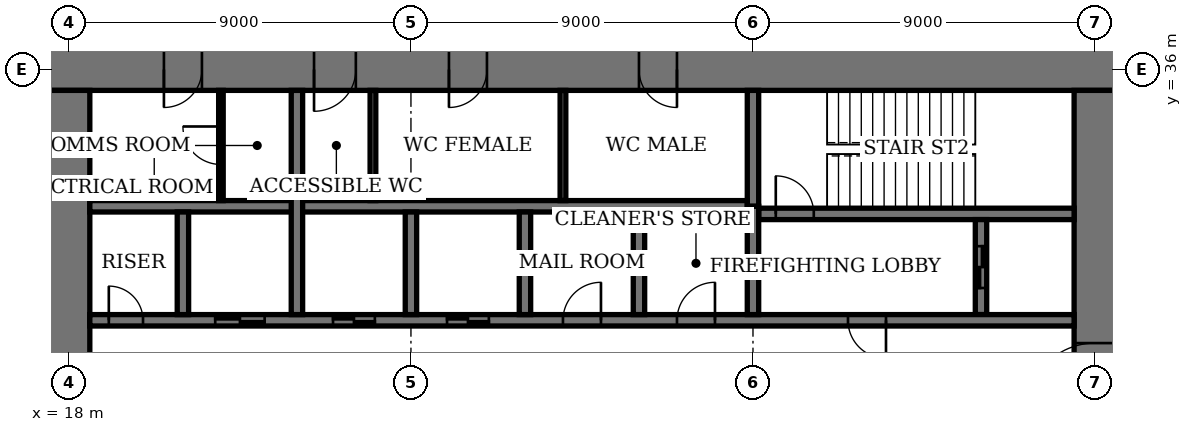
"""IFC4 building model, lengths in metres.
Left out: names, types, materials, properties, quantities, classifications, styles, units other than length and angle.
Written with IfcOpenShell. Run it as: python <this file> out.ifc"""

import sys

from ifc_helpers import new_model, si_unit, direction, frame, frame_2d, origin, place, context, subcontext, project, spatial, rectangle, extrude, element, fill, save


model = new_model("IFC4")
c1 = context("Model", 3, precision=1e-05, world=origin(), true_north=direction((0.0, 1.0)))
c2 = subcontext(c1, "Body", "Model", "MODEL_VIEW")
j1 = project(units=[si_unit("LENGTHUNIT", "METRE"), si_unit("PLANEANGLEUNIT", "RADIAN")], contexts=[c1])
p1 = place(None, origin())
s1 = spatial("IfcSite", under=j1, at=p1, CompositionType="ELEMENT")
p2 = place(p1, origin())
s2 = spatial("IfcBuilding", under=s1, at=p2, CompositionType="ELEMENT")
p3 = place(p2, frame((0.0, 0.0, 230.2)))
s3 = spatial("IfcBuildingStorey", under=s2, at=p3, CompositionType="ELEMENT", Elevation=230.2)
p4 = place(p3, frame((45.55, 36.0, 0.0), z_axis=(0.0, 0.0, 1.0), x_axis=(-1.0, 0.0, 0.0)))
e1 = element("IfcWall", 1, at=p4, inside=s3, PredefinedType="SHEAR", context=c2, shape_type="SweptSolid", body=[
    extrude(rectangle(XDim=28.1, YDim=1.1, at=frame_2d((14.05, 0.0))), origin(), (0.0, 0.0, 1.0), 4.2),
])
p5 = place(p4, frame((11.55, 0.0, 0.0)))
e2 = element("IfcOpeningElement", 2, at=p5, cuts=e1, PredefinedType="OPENING", context=c2, shape_type="SweptSolid", body=[
    extrude(rectangle(XDim=1.0, YDim=2.4, at=frame_2d((0.5, 1.2))), frame((0.0, 0.56, 0.0), z_axis=(0.0, -1.0, 0.0), x_axis=(1.0, 0.0, 0.0)), (0.0, 0.0, 1.0), 1.12),
])
p6 = place(p4, frame((16.55, 0.0, 0.0)))
e3 = element("IfcOpeningElement", 3, at=p6, cuts=e1, PredefinedType="OPENING", context=c2, shape_type="SweptSolid", body=[
    extrude(rectangle(XDim=1.0, YDim=2.4, at=frame_2d((0.5, 1.2))), frame((0.0, 0.56, 0.0), z_axis=(0.0, -1.0, 0.0), x_axis=(1.0, 0.0, 0.0)), (0.0, 0.0, 1.0), 1.12),
])
p7 = place(p4, frame((20.0, 0.0, 0.0)))
e4 = element("IfcOpeningElement", 4, at=p7, cuts=e1, PredefinedType="OPENING", context=c2, shape_type="SweptSolid", body=[
    extrude(rectangle(XDim=1.1, YDim=2.4, at=frame_2d((0.55, 1.2))), frame((0.0, 0.56, 0.0), z_axis=(0.0, -1.0, 0.0), x_axis=(1.0, 0.0, 0.0)), (0.0, 0.0, 1.0), 1.12),
])
p8 = place(p4, frame((24.05, 0.0, 0.0)))
e5 = element("IfcOpeningElement", 5, at=p8, cuts=e1, PredefinedType="OPENING", context=c2, shape_type="SweptSolid", body=[
    extrude(rectangle(XDim=1.0, YDim=2.4, at=frame_2d((0.5, 1.2))), frame((0.0, 0.56, 0.0), z_axis=(0.0, -1.0, 0.0), x_axis=(1.0, 0.0, 0.0)), (0.0, 0.0, 1.0), 1.12),
])
p9 = place(p3, frame((18.0, 35.45, 0.0), z_axis=(0.0, 0.0, 1.0), x_axis=(0.0, -1.0, 0.0)))
e6 = element("IfcWall", 6, at=p9, inside=s3, PredefinedType="SHEAR", context=c2, shape_type="SweptSolid", body=[
    extrude(rectangle(XDim=16.9, YDim=1.1, at=frame_2d((8.45, 0.0))), origin(), (0.0, 0.0, 1.0), 4.2),
])
p10 = place(p9, frame((8.45, 0.0, 0.0)))
e7 = element("IfcOpeningElement", 7, at=p10, cuts=e6, PredefinedType="OPENING", context=c2, shape_type="SweptSolid", body=[
    extrude(rectangle(XDim=1.8, YDim=2.4, at=frame_2d((0.9, 1.2))), frame((0.0, 0.56, 0.0), z_axis=(0.0, -1.0, 0.0), x_axis=(1.0, 0.0, 0.0)), (0.0, 0.0, 1.0), 1.12),
])
p11 = place(p3, frame((45.0, 18.55, 0.0), z_axis=(0.0, 0.0, 1.0), x_axis=(0.0, 1.0, 0.0)))
e8 = element("IfcWall", 8, at=p11, inside=s3, PredefinedType="SHEAR", context=c2, shape_type="SweptSolid", body=[
    extrude(rectangle(XDim=16.9, YDim=1.1, at=frame_2d((8.45, 0.0))), origin(), (0.0, 0.0, 1.0), 4.2),
])
p12 = place(p11, frame((8.45, 0.0, 0.0)))
e9 = element("IfcOpeningElement", 9, at=p12, cuts=e8, PredefinedType="OPENING", context=c2, shape_type="SweptSolid", body=[
    extrude(rectangle(XDim=1.8, YDim=2.4, at=frame_2d((0.9, 1.2))), frame((0.0, 0.56, 0.0), z_axis=(0.0, -1.0, 0.0), x_axis=(1.0, 0.0, 0.0)), (0.0, 0.0, 1.0), 1.12),
])
p13 = place(p3, frame((36.15, 32.2, 0.0), z_axis=(0.0, 0.0, 1.0), x_axis=(1.0, 0.0, 0.0)))
e10 = element("IfcWall", 10, at=p13, inside=s3, PredefinedType="SHEAR", context=c2, shape_type="SweptSolid", body=[
    extrude(rectangle(XDim=8.3, YDim=0.3, at=frame_2d((4.15, 0.0))), origin(), (0.0, 0.0, 1.0), 4.2),
])
p14 = place(p13, frame((0.45, 0.0, 0.0)))
e11 = element("IfcOpeningElement", 11, at=p14, cuts=e10, PredefinedType="OPENING", context=c2, shape_type="SweptSolid", body=[
    extrude(rectangle(XDim=1.0, YDim=2.4, at=frame_2d((0.5, 1.2))), frame((0.0, 0.16, 0.0), z_axis=(0.0, -1.0, 0.0), x_axis=(1.0, 0.0, 0.0)), (0.0, 0.0, 1.0), 0.32),
])
p15 = place(p3, frame((36.0, 32.4, 0.0), z_axis=(0.0, 0.0, 1.0), x_axis=(0.0, 1.0, 0.0)))
e12 = element("IfcWall", 12, at=p15, inside=s3, PredefinedType="SHEAR", context=c2, shape_type="SweptSolid", body=[
    extrude(rectangle(XDim=3.05, YDim=0.3, at=frame_2d((1.525, 0.0))), origin(), (0.0, 0.0, 1.0), 4.2),
])
p16 = place(p3, frame((42.0, 29.55, 0.0), z_axis=(0.0, 0.0, 1.0), x_axis=(0.0, 1.0, 0.0)))
e13 = element("IfcWall", 13, at=p16, inside=s3, PredefinedType="SHEAR", context=c2, shape_type="SweptSolid", body=[
    extrude(rectangle(XDim=2.5, YDim=0.3, at=frame_2d((1.25, 0.0))), origin(), (0.0, 0.0, 1.0), 4.2),
])
p17 = place(p16, frame((0.7, 0.0, 0.0)))
e14 = element("IfcOpeningElement", 14, at=p17, cuts=e13, PredefinedType="OPENING", context=c2, shape_type="SweptSolid", body=[
    extrude(rectangle(XDim=1.1, YDim=2.4, at=frame_2d((0.55, 1.2))), frame((0.0, 0.16, 0.0), z_axis=(0.0, -1.0, 0.0), x_axis=(1.0, 0.0, 0.0)), (0.0, 0.0, 1.0), 0.32),
])
p18 = place(p3, frame((18.55, 29.4, 0.0), z_axis=(0.0, 0.0, 1.0), x_axis=(1.0, 0.0, 0.0)))
e15 = element("IfcWall", 15, at=p18, inside=s3, PredefinedType="SHEAR", context=c2, shape_type="SweptSolid", body=[
    extrude(rectangle(XDim=25.9, YDim=0.3, at=frame_2d((12.95, 0.0))), origin(), (0.0, 0.0, 1.0), 4.2),
])
p19 = place(p18, frame((19.95, 0.0, 0.0)))
e16 = element("IfcOpeningElement", 16, at=p19, cuts=e15, PredefinedType="OPENING", context=c2, shape_type="SweptSolid", body=[
    extrude(rectangle(XDim=1.0, YDim=2.4, at=frame_2d((0.5, 1.2))), frame((0.0, 0.16, 0.0), z_axis=(0.0, -1.0, 0.0), x_axis=(1.0, 0.0, 0.0)), (0.0, 0.0, 1.0), 0.32),
])
p20 = place(p18, frame((0.5, 0.0, 0.0)))
e17 = element("IfcOpeningElement", 17, at=p20, cuts=e15, PredefinedType="OPENING", context=c2, shape_type="SweptSolid", body=[
    extrude(rectangle(XDim=0.9, YDim=2.1, at=frame_2d((0.45, 1.05))), frame((0.0, 0.16, 0.0), z_axis=(0.0, -1.0, 0.0), x_axis=(1.0, 0.0, 0.0)), (0.0, 0.0, 1.0), 0.32),
])
p21 = place(p18, frame((15.45, 0.0, 0.0)))
e18 = element("IfcOpeningElement", 18, at=p21, cuts=e15, PredefinedType="OPENING", context=c2, shape_type="SweptSolid", body=[
    extrude(rectangle(XDim=1.0, YDim=2.4, at=frame_2d((0.5, 1.2))), frame((0.0, 0.16, 0.0), z_axis=(0.0, -1.0, 0.0), x_axis=(1.0, 0.0, 0.0)), (0.0, 0.0, 1.0), 0.32),
])
p22 = place(p18, frame((12.45, 0.0, 0.0)))
e19 = element("IfcOpeningElement", 19, at=p22, cuts=e15, PredefinedType="OPENING", context=c2, shape_type="SweptSolid", body=[
    extrude(rectangle(XDim=1.0, YDim=2.4, at=frame_2d((0.5, 1.2))), frame((0.0, 0.16, 0.0), z_axis=(0.0, -1.0, 0.0), x_axis=(1.0, 0.0, 0.0)), (0.0, 0.0, 1.0), 0.32),
])
p23 = place(p18, frame((9.4, 0.0, 0.0)))
e20 = element("IfcOpeningElement", 20, at=p23, cuts=e15, PredefinedType="OPENING", context=c2, shape_type="SweptSolid", body=[
    extrude(rectangle(XDim=1.1, YDim=2.4, at=frame_2d((0.55, 1.2))), frame((0.0, 0.16, 0.0), z_axis=(0.0, -1.0, 0.0), x_axis=(1.0, 0.0, 0.0)), (0.0, 0.0, 1.0), 0.32),
])
p24 = place(p18, frame((6.4, 0.0, 0.0)))
e21 = element("IfcOpeningElement", 21, at=p24, cuts=e15, PredefinedType="OPENING", context=c2, shape_type="SweptSolid", body=[
    extrude(rectangle(XDim=1.1, YDim=2.4, at=frame_2d((0.55, 1.2))), frame((0.0, 0.16, 0.0), z_axis=(0.0, -1.0, 0.0), x_axis=(1.0, 0.0, 0.0)), (0.0, 0.0, 1.0), 0.32),
])
p25 = place(p18, frame((3.3, 0.0, 0.0)))
e22 = element("IfcOpeningElement", 22, at=p25, cuts=e15, PredefinedType="OPENING", context=c2, shape_type="SweptSolid", body=[
    extrude(rectangle(XDim=1.3, YDim=2.4, at=frame_2d((0.65, 1.2))), frame((0.0, 0.16, 0.0), z_axis=(0.0, -1.0, 0.0), x_axis=(1.0, 0.0, 0.0)), (0.0, 0.0, 1.0), 0.32),
])
p26 = place(p3, frame((18.55, 32.4, 0.0), z_axis=(0.0, 0.0, 1.0), x_axis=(1.0, 0.0, 0.0)))
e23 = element("IfcWall", 23, at=p26, inside=s3, PredefinedType="SHEAR", context=c2, shape_type="SweptSolid", body=[
    extrude(rectangle(XDim=17.3, YDim=0.3, at=frame_2d((8.65, 0.0))), origin(), (0.0, 0.0, 1.0), 4.2),
])
for number, where, z_axis, x_axis in (
    (24, (33.0, 29.55, 0.0), (0.0, 0.0, 1.0), (0.0, 1.0, 0.0)),
    (25, (30.0, 29.55, 0.0), (0.0, 0.0, 1.0), (0.0, 1.0, 0.0)),
    (26, (27.0, 29.55, 0.0), (0.0, 0.0, 1.0), (0.0, 1.0, 0.0)),
):
    element("IfcWall", number, at=place(p3, frame(where, z_axis=z_axis, x_axis=x_axis)), inside=s3, PredefinedType="SHEAR", context=c2, shape_type="SweptSolid", body=[
        extrude(rectangle(XDim=2.7, YDim=0.3, at=frame_2d((1.35, 0.0))), origin(), (0.0, 0.0, 1.0), 4.2),
    ])
p27 = place(p3, frame((24.0, 29.55, 0.0), z_axis=(0.0, 0.0, 1.0), x_axis=(0.0, 1.0, 0.0)))
e27 = element("IfcWall", 27, at=p27, inside=s3, PredefinedType="SHEAR", context=c2, shape_type="SweptSolid", body=[
    extrude(rectangle(XDim=5.9, YDim=0.3, at=frame_2d((2.95, 0.0))), origin(), (0.0, 0.0, 1.0), 4.2),
])
p28 = place(p3, frame((21.0, 29.55, 0.0), z_axis=(0.0, 0.0, 1.0), x_axis=(0.0, 1.0, 0.0)))
e28 = element("IfcWall", 28, at=p28, inside=s3, PredefinedType="SHEAR", context=c2, shape_type="SweptSolid", body=[
    extrude(rectangle(XDim=2.7, YDim=0.3, at=frame_2d((1.35, 0.0))), origin(), (0.0, 0.0, 1.0), 4.2),
])
p29 = place(p3, frame((36.0, 29.55, 0.0), z_axis=(0.0, 0.0, 1.0), x_axis=(0.0, 1.0, 0.0)))
e29 = element("IfcWall", 29, at=p29, inside=s3, PredefinedType="SHEAR", context=c2, shape_type="SweptSolid", body=[
    extrude(rectangle(XDim=2.85, YDim=0.3, at=frame_2d((1.425, 0.0))), origin(), (0.0, 0.0, 1.0), 4.2),
])
for number, where, z_axis, x_axis in (
    (30, (31.0, 32.55, 0.0), (0.0, 0.0, 1.0), (0.0, 1.0, 0.0)),
    (31, (26.0, 32.55, 0.0), (0.0, 0.0, 1.0), (0.0, 1.0, 0.0)),
):
    element("IfcWall", number, at=place(p3, frame(where, z_axis=z_axis, x_axis=x_axis)), inside=s3, PredefinedType="PARTITIONING", context=c2, shape_type="SweptSolid", body=[
        extrude(rectangle(XDim=2.9, YDim=0.15, at=frame_2d((1.45, 0.0))), origin(), (0.0, 0.0, 1.0), 3.85),
    ])
p30 = place(p3, frame((22.0, 32.55, 0.0), z_axis=(0.0, 0.0, 1.0), x_axis=(0.0, 1.0, 0.0)))
e32 = element("IfcWall", 32, at=p30, inside=s3, PredefinedType="PARTITIONING", context=c2, shape_type="SweptSolid", body=[
    extrude(rectangle(XDim=2.9, YDim=0.12, at=frame_2d((1.45, 0.0))), origin(), (0.0, 0.0, 1.0), 3.85),
])
p31 = place(p30, frame((0.95, 0.0, 0.0)))
e33 = element("IfcOpeningElement", 33, at=p31, cuts=e32, PredefinedType="OPENING", context=c2, shape_type="SweptSolid", body=[
    extrude(rectangle(XDim=1.0, YDim=2.4, at=frame_2d((0.5, 1.2))), frame((0.0, 0.07, 0.0), z_axis=(0.0, -1.0, 0.0), x_axis=(1.0, 0.0, 0.0)), (0.0, 0.0, 1.0), 0.14),
])
p32 = place(p12, origin())
e34 = element("IfcDoor", 34, at=p32, inside=s3, OperationType="DOUBLE_DOOR_DOUBLE_SWING", PredefinedType="DOOR", context=c2, shape_type="SweptSolid", body=[
    extrude(rectangle(XDim=1.8, YDim=2.4, at=frame_2d((0.9, 1.2))), frame((0.0, 0.03, 0.0), z_axis=(0.0, -1.0, 0.0), x_axis=(1.0, 0.0, 0.0)), (0.0, 0.0, 1.0), 0.06),
    extrude(rectangle(XDim=0.04, YDim=2.4, at=frame_2d((0.02, 1.2))), frame((0.0, 0.55, 0.0), z_axis=(0.0, -1.0, 0.0), x_axis=(1.0, 0.0, 0.0)), (0.0, 0.0, 1.0), 1.1),
    extrude(rectangle(XDim=0.04, YDim=2.4, at=frame_2d((1.78, 1.2))), frame((0.0, 0.55, 0.0), z_axis=(0.0, -1.0, 0.0), x_axis=(1.0, 0.0, 0.0)), (0.0, 0.0, 1.0), 1.1),
    extrude(rectangle(XDim=1.8, YDim=0.04, at=frame_2d((0.9, 2.38))), frame((0.0, 0.55, 0.0), z_axis=(0.0, -1.0, 0.0), x_axis=(1.0, 0.0, 0.0)), (0.0, 0.0, 1.0), 1.1),
])
fill(e9, e34)
p33 = place(p5, origin())
e35 = element("IfcDoor", 35, at=p33, inside=s3, OperationType="SINGLE_SWING_RIGHT", PredefinedType="DOOR", context=c2, shape_type="SweptSolid", body=[
    extrude(rectangle(XDim=1.0, YDim=2.4, at=frame_2d((0.5, 1.2))), frame((0.0, 0.025, 0.0), z_axis=(0.0, -1.0, 0.0), x_axis=(1.0, 0.0, 0.0)), (0.0, 0.0, 1.0), 0.05),
    extrude(rectangle(XDim=0.04, YDim=2.4, at=frame_2d((0.02, 1.2))), frame((0.0, 0.4, 0.0), z_axis=(0.0, -1.0, 0.0), x_axis=(1.0, 0.0, 0.0)), (0.0, 0.0, 1.0), 0.8),
    extrude(rectangle(XDim=0.04, YDim=2.4, at=frame_2d((0.98, 1.2))), frame((0.0, 0.4, 0.0), z_axis=(0.0, -1.0, 0.0), x_axis=(1.0, 0.0, 0.0)), (0.0, 0.0, 1.0), 0.8),
    extrude(rectangle(XDim=1.0, YDim=0.04, at=frame_2d((0.5, 2.38))), frame((0.0, 0.4, 0.0), z_axis=(0.0, -1.0, 0.0), x_axis=(1.0, 0.0, 0.0)), (0.0, 0.0, 1.0), 0.8),
])
fill(e2, e35)
p34 = place(p6, origin())
e36 = element("IfcDoor", 36, at=p34, inside=s3, OperationType="SINGLE_SWING_LEFT", PredefinedType="DOOR", context=c2, shape_type="SweptSolid", body=[
    extrude(rectangle(XDim=1.0, YDim=2.4, at=frame_2d((0.5, 1.2))), frame((0.0, 0.025, 0.0), z_axis=(0.0, -1.0, 0.0), x_axis=(1.0, 0.0, 0.0)), (0.0, 0.0, 1.0), 0.05),
    extrude(rectangle(XDim=0.04, YDim=2.4, at=frame_2d((0.02, 1.2))), frame((0.0, 0.4, 0.0), z_axis=(0.0, -1.0, 0.0), x_axis=(1.0, 0.0, 0.0)), (0.0, 0.0, 1.0), 0.8),
    extrude(rectangle(XDim=0.04, YDim=2.4, at=frame_2d((0.98, 1.2))), frame((0.0, 0.4, 0.0), z_axis=(0.0, -1.0, 0.0), x_axis=(1.0, 0.0, 0.0)), (0.0, 0.0, 1.0), 0.8),
    extrude(rectangle(XDim=1.0, YDim=0.04, at=frame_2d((0.5, 2.38))), frame((0.0, 0.4, 0.0), z_axis=(0.0, -1.0, 0.0), x_axis=(1.0, 0.0, 0.0)), (0.0, 0.0, 1.0), 0.8),
])
fill(e3, e36)
p35 = place(p7, origin())
e37 = element("IfcDoor", 37, at=p35, inside=s3, OperationType="SINGLE_SWING_LEFT", PredefinedType="DOOR", context=c2, shape_type="SweptSolid", body=[
    extrude(rectangle(XDim=1.1, YDim=2.4, at=frame_2d((0.55, 1.2))), frame((0.0, 0.025, 0.0), z_axis=(0.0, -1.0, 0.0), x_axis=(1.0, 0.0, 0.0)), (0.0, 0.0, 1.0), 0.05),
    extrude(rectangle(XDim=0.04, YDim=2.4, at=frame_2d((0.02, 1.2))), frame((0.0, 0.44, 0.0), z_axis=(0.0, -1.0, 0.0), x_axis=(1.0, 0.0, 0.0)), (0.0, 0.0, 1.0), 0.88),
    extrude(rectangle(XDim=0.04, YDim=2.4, at=frame_2d((1.08, 1.2))), frame((0.0, 0.44, 0.0), z_axis=(0.0, -1.0, 0.0), x_axis=(1.0, 0.0, 0.0)), (0.0, 0.0, 1.0), 0.88),
    extrude(rectangle(XDim=1.1, YDim=0.04, at=frame_2d((0.55, 2.38))), frame((0.0, 0.44, 0.0), z_axis=(0.0, -1.0, 0.0), x_axis=(1.0, 0.0, 0.0)), (0.0, 0.0, 1.0), 0.88),
])
fill(e4, e37)
p36 = place(p8, origin())
e38 = element("IfcDoor", 38, at=p36, inside=s3, OperationType="SINGLE_SWING_LEFT", PredefinedType="DOOR", context=c2, shape_type="SweptSolid", body=[
    extrude(rectangle(XDim=1.0, YDim=2.4, at=frame_2d((0.5, 1.2))), frame((0.0, 0.025, 0.0), z_axis=(0.0, -1.0, 0.0), x_axis=(1.0, 0.0, 0.0)), (0.0, 0.0, 1.0), 0.05),
    extrude(rectangle(XDim=0.04, YDim=2.4, at=frame_2d((0.02, 1.2))), frame((0.0, 0.4, 0.0), z_axis=(0.0, -1.0, 0.0), x_axis=(1.0, 0.0, 0.0)), (0.0, 0.0, 1.0), 0.8),
    extrude(rectangle(XDim=0.04, YDim=2.4, at=frame_2d((0.98, 1.2))), frame((0.0, 0.4, 0.0), z_axis=(0.0, -1.0, 0.0), x_axis=(1.0, 0.0, 0.0)), (0.0, 0.0, 1.0), 0.8),
    extrude(rectangle(XDim=1.0, YDim=0.04, at=frame_2d((0.5, 2.38))), frame((0.0, 0.4, 0.0), z_axis=(0.0, -1.0, 0.0), x_axis=(1.0, 0.0, 0.0)), (0.0, 0.0, 1.0), 0.8),
])
fill(e5, e38)
p37 = place(p14, origin())
e39 = element("IfcDoor", 39, at=p37, inside=s3, OperationType="SINGLE_SWING_RIGHT", PredefinedType="DOOR", context=c2, shape_type="SweptSolid", body=[
    extrude(rectangle(XDim=1.0, YDim=2.4, at=frame_2d((0.5, 1.2))), frame((0.0, 0.03, 0.0), z_axis=(0.0, -1.0, 0.0), x_axis=(1.0, 0.0, 0.0)), (0.0, 0.0, 1.0), 0.06),
])
fill(e11, e39)
p38 = place(p19, origin())
e40 = element("IfcDoor", 40, at=p38, inside=s3, OperationType="SINGLE_SWING_RIGHT", PredefinedType="DOOR", context=c2, shape_type="SweptSolid", body=[
    extrude(rectangle(XDim=1.0, YDim=2.4, at=frame_2d((0.5, 1.2))), frame((0.0, 0.03, 0.0), z_axis=(0.0, -1.0, 0.0), x_axis=(1.0, 0.0, 0.0)), (0.0, 0.0, 1.0), 0.06),
])
fill(e16, e40)
p39 = place(p20, origin())
e41 = element("IfcDoor", 41, at=p39, inside=s3, OperationType="SINGLE_SWING_RIGHT", PredefinedType="DOOR", context=c2, shape_type="SweptSolid", body=[
    extrude(rectangle(XDim=0.9, YDim=2.1, at=frame_2d((0.45, 1.05))), frame((0.0, 0.03, 0.0), z_axis=(0.0, -1.0, 0.0), x_axis=(1.0, 0.0, 0.0)), (0.0, 0.0, 1.0), 0.06),
])
fill(e17, e41)
p40 = place(p31, origin())
e42 = element("IfcDoor", 42, at=p40, inside=s3, OperationType="SINGLE_SWING_LEFT", PredefinedType="DOOR", context=c2, shape_type="SweptSolid", body=[
    extrude(rectangle(XDim=1.0, YDim=2.4, at=frame_2d((0.5, 1.2))), frame((0.0, 0.03, 0.0), z_axis=(0.0, -1.0, 0.0), x_axis=(1.0, 0.0, 0.0)), (0.0, 0.0, 1.0), 0.06),
])
fill(e33, e42)
p41 = place(p21, origin())
e43 = element("IfcDoor", 43, at=p41, inside=s3, OperationType="SINGLE_SWING_LEFT", PredefinedType="DOOR", context=c2, shape_type="SweptSolid", body=[
    extrude(rectangle(XDim=1.0, YDim=2.4, at=frame_2d((0.5, 1.2))), frame((0.0, 0.03, 0.0), z_axis=(0.0, -1.0, 0.0), x_axis=(1.0, 0.0, 0.0)), (0.0, 0.0, 1.0), 0.06),
])
fill(e18, e43)
p42 = place(p22, origin())
e44 = element("IfcDoor", 44, at=p42, inside=s3, OperationType="SINGLE_SWING_LEFT", PredefinedType="DOOR", context=c2, shape_type="SweptSolid", body=[
    extrude(rectangle(XDim=1.0, YDim=2.4, at=frame_2d((0.5, 1.2))), frame((0.0, 0.03, 0.0), z_axis=(0.0, -1.0, 0.0), x_axis=(1.0, 0.0, 0.0)), (0.0, 0.0, 1.0), 0.06),
])
fill(e19, e44)
p43 = place(p23, origin())
e45 = element("IfcDoor", 45, at=p43, inside=s3, OperationType="DOUBLE_DOOR_SLIDING", PredefinedType="DOOR", context=c2, shape_type="SweptSolid", body=[
    extrude(rectangle(XDim=1.1, YDim=2.4, at=frame_2d((0.55, 1.2))), frame((0.0, 0.02, 0.0), z_axis=(0.0, -1.0, 0.0), x_axis=(1.0, 0.0, 0.0)), (0.0, 0.0, 1.0), 0.04),
])
fill(e20, e45)
p44 = place(p24, origin())
e46 = element("IfcDoor", 46, at=p44, inside=s3, OperationType="DOUBLE_DOOR_SLIDING", PredefinedType="DOOR", context=c2, shape_type="SweptSolid", body=[
    extrude(rectangle(XDim=1.1, YDim=2.4, at=frame_2d((0.55, 1.2))), frame((0.0, 0.02, 0.0), z_axis=(0.0, -1.0, 0.0), x_axis=(1.0, 0.0, 0.0)), (0.0, 0.0, 1.0), 0.04),
])
fill(e21, e46)
p45 = place(p25, origin())
e47 = element("IfcDoor", 47, at=p45, inside=s3, OperationType="DOUBLE_DOOR_SLIDING", PredefinedType="DOOR", context=c2, shape_type="SweptSolid", body=[
    extrude(rectangle(XDim=1.3, YDim=2.4, at=frame_2d((0.65, 1.2))), frame((0.0, 0.02, 0.0), z_axis=(0.0, -1.0, 0.0), x_axis=(1.0, 0.0, 0.0)), (0.0, 0.0, 1.0), 0.04),
])
fill(e22, e47)
p46 = place(p17, origin())
e48 = element("IfcDoor", 48, at=p46, inside=s3, OperationType="DOUBLE_DOOR_SLIDING", PredefinedType="DOOR", context=c2, shape_type="SweptSolid", body=[
    extrude(rectangle(XDim=1.1, YDim=2.4, at=frame_2d((0.55, 1.2))), frame((0.0, 0.03, 0.0), z_axis=(0.0, -1.0, 0.0), x_axis=(1.0, 0.0, 0.0)), (0.0, 0.0, 1.0), 0.06),
])
fill(e14, e48)
save(model, sys.argv[1])
